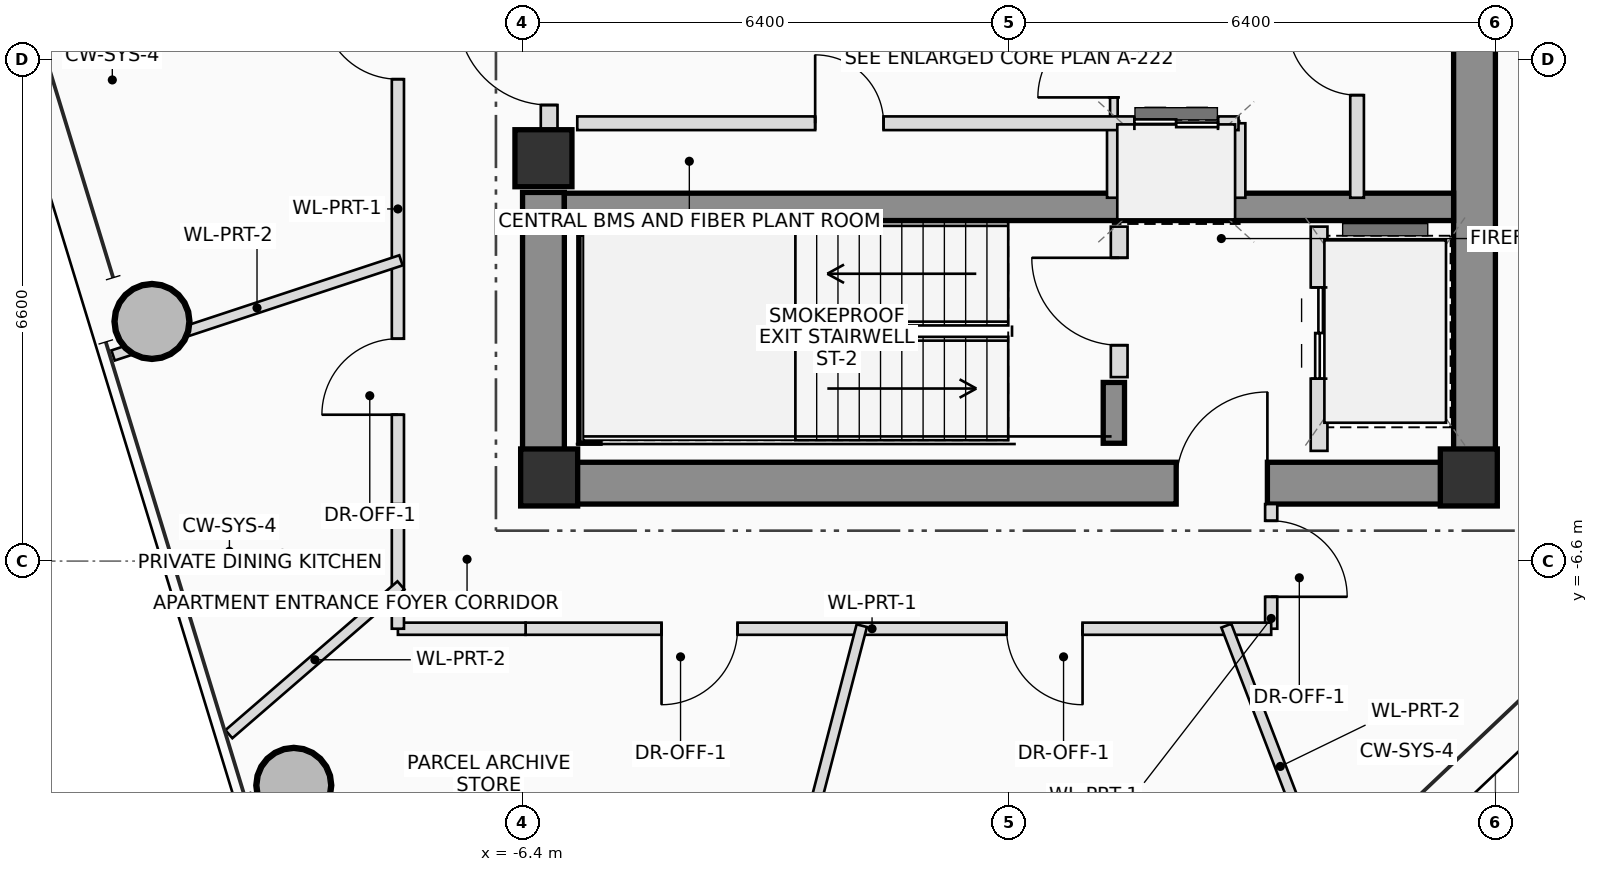
"""IFC4 building model, lengths in metres.
Left out: names, types, materials, properties, quantities, classifications, styles, units other than length and angle.
Written with IfcOpenShell. Run it as: python <this file> out.ifc"""

import sys

from ifc_helpers import new_model, si_unit, direction, frame, frame_2d, origin, origin_2d, place, context, subcontext, project, spatial, rectangle, hollow_circle, extrude, source, transform, mapped, element, fill, save


model = new_model("IFC4")
c1 = context("Model", 3, precision=1e-05, world=origin(), true_north=direction((0.0, 1.0)))
c2 = subcontext(c1, "Body", "Model", "MODEL_VIEW")
j1 = project(units=[si_unit("LENGTHUNIT", "METRE"), si_unit("PLANEANGLEUNIT", "RADIAN")], contexts=[c1])
p1 = place(None, origin())
s1 = spatial("IfcSite", under=j1, at=p1, CompositionType="ELEMENT")
p2 = place(p1, origin())
s2 = spatial("IfcBuilding", under=s1, at=p2, CompositionType="ELEMENT")
p3 = place(p2, frame((0.0, 0.0, 238.85)))
s3 = spatial("IfcBuildingStorey", under=s2, at=p3, CompositionType="ELEMENT", Elevation=238.85)
m1 = source(origin(), c2, "Body", "SweptSolid", [
    extrude(rectangle(XDim=0.75, YDim=0.75, at=origin_2d()), origin(), (0.0, 0.0, 1.0), 3.4),
])
for number, where, z_axis, x_axis in (
    (1, (-6.05, -5.5, 0.0), (0.0, 0.0, 1.0), (1.0, 0.0, 0.0)),
    (2, (6.05, -5.5, 0.0), (0.0, 0.0, 1.0), (1.0, 0.0, 0.0)),
):
    element("IfcColumn", number, at=place(p3, frame(where, z_axis=z_axis, x_axis=x_axis)), inside=s3, PredefinedType="COLUMN", context=c2, shape_type="MappedRepresentation", body=[
        mapped(m1, transform((0.0, 0.0, 0.0), scale=1.0)),
    ])
p4 = place(p3, frame((-6.4, -5.575, 0.0), z_axis=(0.0, 0.0, 1.0), x_axis=(1.0, 0.0, 0.0)))
e3 = element("IfcWall", 3, at=p4, inside=s3, PredefinedType="SHEAR", context=c2, shape_type="SweptSolid", body=[
    extrude(rectangle(XDim=12.8, YDim=0.55, at=frame_2d((6.4, 0.0))), origin(), (0.0, 0.0, 1.0), 3.4),
])
p5 = place(p4, frame((8.6, 0.0, 0.0)))
e4 = element("IfcOpeningElement", 4, at=p5, cuts=e3, PredefinedType="OPENING", context=c2, shape_type="SweptSolid", body=[
    extrude(rectangle(XDim=1.2, YDim=2.2, at=frame_2d((0.6, 1.1))), frame((0.0, 0.285, 0.0), z_axis=(0.0, -1.0, 0.0), x_axis=(1.0, 0.0, 0.0)), (0.0, 0.0, 1.0), 0.57),
])
p6 = place(p3, frame((6.125, -5.3, 0.0), z_axis=(0.0, 0.0, 1.0), x_axis=(0.0, 1.0, 0.0)))
e5 = element("IfcWall", 5, at=p6, inside=s3, PredefinedType="SHEAR", context=c2, shape_type="SweptSolid", body=[
    extrude(rectangle(XDim=10.6, YDim=0.55, at=frame_2d((5.3, 0.0))), origin(), (0.0, 0.0, 1.0), 3.4),
])
p7 = place(p3, frame((-6.125, -5.3, 0.0), z_axis=(0.0, 0.0, 1.0), x_axis=(0.0, 1.0, 0.0)))
e6 = element("IfcWall", 6, at=p7, inside=s3, PredefinedType="SHEAR", context=c2, shape_type="SweptSolid", body=[
    extrude(rectangle(XDim=3.55, YDim=0.55, at=frame_2d((1.775, 0.0))), origin(), (0.0, 0.0, 1.0), 3.4),
])
p8 = place(p3, frame((-5.85, -1.94, 0.0), z_axis=(0.0, 0.0, 1.0), x_axis=(1.0, 0.0, 0.0)))
e7 = element("IfcWall", 7, at=p8, inside=s3, PredefinedType="SHEAR", context=c2, shape_type="SweptSolid", body=[
    extrude(rectangle(XDim=11.7, YDim=0.36, at=frame_2d((5.85, 0.0))), origin(), (0.0, 0.0, 1.0), 3.4),
])
p9 = place(p3, frame((-5.52, -5.05, 0.0), z_axis=(0.0, 0.0, 1.0), x_axis=(0.0, 1.0, 0.0)))
e8 = element("IfcWall", 8, at=p9, inside=s3, PredefinedType="SHEAR", context=c2, shape_type="SweptSolid", body=[
    extrude(rectangle(XDim=2.75, YDim=0.28, at=frame_2d((1.375, 0.0))), origin(), (0.0, 0.0, 1.0), 3.4),
])
p10 = place(p3, frame((1.38, -5.05, 0.0), z_axis=(0.0, 0.0, 1.0), x_axis=(0.0, 1.0, 0.0)))
e9 = element("IfcWall", 9, at=p10, inside=s3, PredefinedType="SHEAR", context=c2, shape_type="SweptSolid", body=[
    extrude(rectangle(XDim=0.8, YDim=0.28, at=frame_2d((0.4, 0.0))), origin(), (0.0, 0.0, 1.0), 3.4),
])
p11 = place(p3, frame((-6.125, -1.3, 0.0), z_axis=(0.0, 0.0, 1.0), x_axis=(1.0, 0.0, 0.0)))
e10 = element("IfcColumn", 10, at=p11, inside=s3, PredefinedType="COLUMN", context=c2, shape_type="MappedRepresentation", body=[
    mapped(m1, transform((0.0, 0.0, 0.0), scale=1.0)),
])
m2 = source(origin(), c2, "Body", "SweptSolid", [
    extrude(hollow_circle(Radius=0.5, WallThickness=0.04, at=origin_2d()), origin(), (0.0, 0.0, 1.0), 3.4),
])
for number, where, z_axis, x_axis in (
    (11, (-11.276, -3.448, 0.0), (0.0, 0.0, 1.0), (1.0, 0.0, 0.0)),
    (12, (-9.41, -9.55, 0.0), (0.0, 0.0, 1.0), (1.0, 0.0, 0.0)),
):
    element("IfcColumn", number, at=place(p3, frame(where, z_axis=z_axis, x_axis=x_axis)), inside=s3, PredefinedType="COLUMN", context=c2, shape_type="MappedRepresentation", body=[
        mapped(m2, transform((0.0, 0.0, 0.0), scale=1.0)),
    ])
p12 = place(p3, frame((-6.05, -0.95, 0.0), z_axis=(0.0, 0.0, 1.0), x_axis=(0.0, 1.0, 0.0)))
e13 = element("IfcWall", 13, at=p12, inside=s3, PredefinedType="PLUMBINGWALL", context=c2, shape_type="SweptSolid", body=[
    extrude(rectangle(XDim=1.9, YDim=0.22, at=frame_2d((0.95, 0.0))), origin(), (0.0, 0.0, 1.0), 2.18),
])
p13 = place(p12, frame((0.35, 0.0, 0.0)))
e14 = element("IfcOpeningElement", 14, at=p13, cuts=e13, PredefinedType="OPENING", context=c2, shape_type="SweptSolid", body=[
    extrude(rectangle(XDim=1.2, YDim=2.2, at=frame_2d((0.6, 1.1))), frame((0.0, 0.12, 0.0), z_axis=(0.0, -1.0, 0.0), x_axis=(1.0, 0.0, 0.0)), (0.0, 0.0, 1.0), 0.24),
])
p14 = place(p3, frame((1.45, -4.18, 0.0), z_axis=(0.0, 0.0, 1.0), x_axis=(0.0, 1.0, 0.0)))
e15 = element("IfcWall", 15, at=p14, inside=s3, PredefinedType="PLUMBINGWALL", context=c2, shape_type="SweptSolid", body=[
    extrude(rectangle(XDim=1.98, YDim=0.22, at=frame_2d((0.99, 0.0))), origin(), (0.0, 0.0, 1.0), 3.2),
])
p15 = place(p14, frame((0.42, 0.0, 0.0)))
e16 = element("IfcOpeningElement", 16, at=p15, cuts=e15, PredefinedType="OPENING", context=c2, shape_type="SweptSolid", body=[
    extrude(rectangle(XDim=1.15, YDim=2.15, at=frame_2d((0.575, 1.075))), frame((0.0, 0.12, 0.0), z_axis=(0.0, -1.0, 0.0), x_axis=(1.0, 0.0, 0.0)), (0.0, 0.0, 1.0), 0.24),
])
p16 = place(p3, frame((4.08, -5.15, 0.0), z_axis=(0.0, 0.0, 1.0), x_axis=(0.0, 1.0, 0.0)))
e17 = element("IfcWall", 17, at=p16, inside=s3, PredefinedType="PLUMBINGWALL", context=c2, shape_type="SweptSolid", body=[
    extrude(rectangle(XDim=2.95, YDim=0.22, at=frame_2d((1.475, 0.0))), origin(), (0.0, 0.0, 1.0), 3.2),
])
p17 = place(p16, frame((0.95, 0.0, 0.0)))
e18 = element("IfcOpeningElement", 18, at=p17, cuts=e17, PredefinedType="OPENING", context=c2, shape_type="SweptSolid", body=[
    extrude(rectangle(XDim=1.2, YDim=2.25, at=frame_2d((0.6, 1.125))), frame((0.0, 0.12, 0.0), z_axis=(0.0, -1.0, 0.0), x_axis=(1.0, 0.0, 0.0)), (0.0, 0.0, 1.0), 0.24),
])
p18 = place(p3, frame((1.38, -0.84, 0.0), z_axis=(0.0, 0.0, 1.0), x_axis=(0.0, 1.0, 0.0)))
e19 = element("IfcWall", 19, at=p18, inside=s3, PredefinedType="PARTITIONING", context=c2, shape_type="SweptSolid", body=[
    extrude(rectangle(XDim=1.68, YDim=0.1, at=frame_2d((0.84, 0.0))), origin(), (0.0, 0.0, 1.0), 3.2),
])
p19 = place(p18, frame((0.34, 0.0, 0.0)))
e20 = element("IfcOpeningElement", 20, at=p19, cuts=e19, PredefinedType="OPENING", context=c2, shape_type="SweptSolid", body=[
    extrude(rectangle(XDim=1.0, YDim=2.25, at=frame_2d((0.5, 1.125))), frame((0.0, 0.06, 0.0), z_axis=(0.0, -1.0, 0.0), x_axis=(1.0, 0.0, 0.0)), (0.0, 0.0, 1.0), 0.12),
])
for number, where, z_axis, x_axis in (
    (21, (1.38, -1.82, 0.0), (0.0, 0.0, 1.0), (0.0, 1.0, 0.0)),
    (22, (3.02, -1.82, 0.0), (0.0, 0.0, 1.0), (0.0, 1.0, 0.0)),
):
    element("IfcWall", number, at=place(p3, frame(where, z_axis=z_axis, x_axis=x_axis)), inside=s3, PredefinedType="PLUMBINGWALL", context=c2, shape_type="SweptSolid", body=[
        extrude(rectangle(XDim=0.98, YDim=0.18, at=frame_2d((0.49, 0.0))), origin(), (0.0, 0.0, 1.0), 3.2),
    ])
p20 = place(p3, frame((4.58, -1.82, 0.0), z_axis=(0.0, 0.0, 1.0), x_axis=(0.0, 1.0, 0.0)))
e23 = element("IfcWall", 23, at=p20, inside=s3, PredefinedType="PLUMBINGWALL", context=c2, shape_type="SweptSolid", body=[
    extrude(rectangle(XDim=3.64, YDim=0.18, at=frame_2d((1.82, 0.0))), origin(), (0.0, 0.0, 1.0), 3.2),
])
p21 = place(p20, frame((1.35, 0.0, 0.0)))
e24 = element("IfcOpeningElement", 24, at=p21, cuts=e23, PredefinedType="OPENING", context=c2, shape_type="SweptSolid", body=[
    extrude(rectangle(XDim=0.9, YDim=2.05, at=frame_2d((0.45, 1.025))), frame((0.0, 0.1, 0.0), z_axis=(0.0, -1.0, 0.0), x_axis=(1.0, 0.0, 0.0)), (0.0, 0.0, 1.0), 0.2),
])
p22 = place(p3, frame((-5.68, -0.84, 0.0), z_axis=(0.0, 0.0, 1.0), x_axis=(1.0, 0.0, 0.0)))
e25 = element("IfcWall", 25, at=p22, inside=s3, PredefinedType="PLUMBINGWALL", context=c2, shape_type="SweptSolid", body=[
    extrude(rectangle(XDim=8.7, YDim=0.18, at=frame_2d((4.35, 0.0))), origin(), (0.0, 0.0, 1.0), 3.2),
])
p23 = place(p22, frame((3.13, 0.0, 0.0)))
e26 = element("IfcOpeningElement", 26, at=p23, cuts=e25, PredefinedType="OPENING", context=c2, shape_type="SweptSolid", body=[
    extrude(rectangle(XDim=0.9, YDim=2.05, at=frame_2d((0.45, 1.025))), frame((0.0, 0.1, 0.0), z_axis=(0.0, -1.0, 0.0), x_axis=(1.0, 0.0, 0.0)), (0.0, 0.0, 1.0), 0.2),
])
p24 = place(p22, frame((7.33, 0.0, 0.0)))
e27 = element("IfcOpeningElement", 27, at=p24, cuts=e25, PredefinedType="OPENING", context=c2, shape_type="SweptSolid", body=[
    extrude(rectangle(XDim=1.1, YDim=2.2, at=frame_2d((0.55, 1.1))), frame((0.0, 0.1, 0.0), z_axis=(0.0, -1.0, 0.0), x_axis=(1.0, 0.0, 0.0)), (0.0, 0.0, 1.0), 0.2),
])
p25 = place(p3, frame((3.45, -5.85, 0.0), z_axis=(0.0, 0.0, 1.0), x_axis=(0.0, -1.0, 0.0)))
e28 = element("IfcWall", 28, at=p25, inside=s3, PredefinedType="PARTITIONING", context=c2, shape_type="SweptSolid", body=[
    extrude(rectangle(XDim=1.64, YDim=0.16, at=frame_2d((0.82, 0.0))), origin(), (0.0, 0.0, 1.0), 3.2),
])
p26 = place(p25, frame((0.22, 0.0, 0.0)))
e29 = element("IfcOpeningElement", 29, at=p26, cuts=e28, PredefinedType="OPENING", context=c2, shape_type="SweptSolid", body=[
    extrude(rectangle(XDim=1.0, YDim=2.25, at=frame_2d((0.5, 1.125))), frame((0.0, 0.09, 0.0), z_axis=(0.0, -1.0, 0.0), x_axis=(1.0, 0.0, 0.0)), (0.0, 0.0, 1.0), 0.18),
])
p27 = place(p3, frame((3.45, -7.49, 0.0), z_axis=(0.0, 0.0, 1.0), x_axis=(-1.0, 0.0, 0.0)))
e30 = element("IfcWall", 30, at=p27, inside=s3, PredefinedType="PARTITIONING", context=c2, shape_type="SweptSolid", body=[
    extrude(rectangle(XDim=9.81, YDim=0.16, at=frame_2d((4.905, 0.0))), origin(), (0.0, 0.0, 1.0), 2.605),
])
p28 = place(p27, frame((2.482, 0.0, 0.0)))
e31 = element("IfcOpeningElement", 31, at=p28, cuts=e30, PredefinedType="OPENING", context=c2, shape_type="SweptSolid", body=[
    extrude(rectangle(XDim=1.0, YDim=2.25, at=frame_2d((0.5, 1.125))), frame((0.0, 0.09, 0.0), z_axis=(0.0, -1.0, 0.0), x_axis=(1.0, 0.0, 0.0)), (0.0, 0.0, 1.0), 0.18),
])
p29 = place(p27, frame((7.021, 0.0, 0.0)))
e32 = element("IfcOpeningElement", 32, at=p29, cuts=e30, PredefinedType="OPENING", context=c2, shape_type="SweptSolid", body=[
    extrude(rectangle(XDim=1.0, YDim=2.25, at=frame_2d((0.5, 1.125))), frame((0.0, 0.09, 0.0), z_axis=(0.0, -1.0, 0.0), x_axis=(1.0, 0.0, 0.0)), (0.0, 0.0, 1.0), 0.18),
])
p30 = place(p3, frame((-6.36, -7.49, 0.0), z_axis=(0.0, 0.0, 1.0), x_axis=(-1.0, 0.0, 0.0)))
e33 = element("IfcWall", 33, at=p30, inside=s3, PredefinedType="PARTITIONING", context=c2, shape_type="SweptSolid", body=[
    extrude(rectangle(XDim=1.68, YDim=0.16, at=frame_2d((0.84, 0.0))), origin(), (0.0, 0.0, 1.0), 2.605),
])
p31 = place(p3, frame((-8.04, -7.49, 0.0), z_axis=(0.0, 0.0, 1.0), x_axis=(0.0, 1.0, 0.0)))
e34 = element("IfcWall", 34, at=p31, inside=s3, PredefinedType="PARTITIONING", context=c2, shape_type="SweptSolid", body=[
    extrude(rectangle(XDim=1.64, YDim=0.16, at=frame_2d((0.82, 0.0))), origin(), (0.0, 0.0, 1.0), 2.805),
])
p32 = place(p3, frame((-8.04, -5.85, 0.0), z_axis=(0.0, 0.0, 1.0), x_axis=(0.0, 1.0, 0.0)))
e35 = element("IfcWall", 35, at=p32, inside=s3, PredefinedType="PARTITIONING", context=c2, shape_type="SweptSolid", body=[
    extrude(rectangle(XDim=11.7, YDim=0.16, at=frame_2d((5.85, 0.0))), origin(), (0.0, 0.0, 1.0), 2.605),
])
p33 = place(p32, frame((1.175, 0.0, 0.0)))
e36 = element("IfcOpeningElement", 36, at=p33, cuts=e35, PredefinedType="OPENING", context=c2, shape_type="SweptSolid", body=[
    extrude(rectangle(XDim=1.0, YDim=2.25, at=frame_2d((0.5, 1.125))), frame((0.0, 0.09, 0.0), z_axis=(0.0, -1.0, 0.0), x_axis=(1.0, 0.0, 0.0)), (0.0, 0.0, 1.0), 0.18),
])
p34 = place(p32, frame((5.59, 0.0, 0.0)))
e37 = element("IfcOpeningElement", 37, at=p34, cuts=e35, PredefinedType="OPENING", context=c2, shape_type="SweptSolid", body=[
    extrude(rectangle(XDim=1.0, YDim=2.25, at=frame_2d((0.5, 1.125))), frame((0.0, 0.09, 0.0), z_axis=(0.0, -1.0, 0.0), x_axis=(1.0, 0.0, 0.0)), (0.0, 0.0, 1.0), 0.18),
])
p35 = place(p32, frame((9.766, 0.0, 0.0)))
e38 = element("IfcOpeningElement", 38, at=p35, cuts=e35, PredefinedType="OPENING", context=c2, shape_type="SweptSolid", body=[
    extrude(rectangle(XDim=1.0, YDim=2.25, at=frame_2d((0.5, 1.125))), frame((0.0, 0.09, 0.0), z_axis=(0.0, -1.0, 0.0), x_axis=(1.0, 0.0, 0.0)), (0.0, 0.0, 1.0), 0.18),
])
p36 = place(p3, frame((-8.0, -2.644, 0.0), z_axis=(0.0, 0.0, 1.0), x_axis=(-0.949500330173, -0.313766032263, 0.0)))
e39 = element("IfcWall", 39, at=p36, inside=s3, PredefinedType="PARTITIONING", context=c2, shape_type="SweptSolid", body=[
    extrude(rectangle(XDim=3.989, YDim=0.14, at=frame_2d((1.994, 0.0))), origin(), (0.0, 0.0, 1.0), 2.605),
])
p37 = place(p3, frame((-8.0, -6.919, 0.0), z_axis=(0.0, 0.0, 1.0), x_axis=(-0.756358809539, -0.654156977516, 0.0)))
e40 = element("IfcWall", 40, at=p37, inside=s3, PredefinedType="PARTITIONING", context=c2, shape_type="SweptSolid", body=[
    extrude(rectangle(XDim=2.993, YDim=0.14, at=frame_2d((1.497, 0.0))), origin(), (0.0, 0.0, 1.0), 2.765),
])
p38 = place(p3, frame((-1.937, -7.45, 0.0), z_axis=(0.0, 0.0, 1.0), x_axis=(-0.251581963347, -0.967835996292, 0.0)))
e41 = element("IfcWall", 41, at=p38, inside=s3, PredefinedType="PARTITIONING", context=c2, shape_type="SweptSolid", body=[
    extrude(rectangle(XDim=11.988, YDim=0.14, at=frame_2d((5.994, 0.0))), origin(), (0.0, 0.0, 1.0), 2.605),
])
p39 = place(p3, frame((2.86, -7.45, 0.0), z_axis=(0.0, 0.0, 1.0), x_axis=(0.35834382605, -0.933589686282, 0.0)))
e42 = element("IfcWall", 42, at=p39, inside=s3, PredefinedType="PARTITIONING", context=c2, shape_type="SweptSolid", body=[
    extrude(rectangle(XDim=3.967, YDim=0.14, at=frame_2d((1.983, 0.0))), origin(), (0.0, 0.0, 1.0), 2.605),
])
p40 = place(p5, origin())
e43 = element("IfcDoor", 43, at=p40, inside=s3, OperationType="SINGLE_SWING_RIGHT", PredefinedType="DOOR", context=c2, shape_type="SweptSolid", body=[
    extrude(rectangle(XDim=1.2, YDim=2.2, at=frame_2d((0.6, 1.1))), frame((0.0, 0.025, 0.0), z_axis=(0.0, -1.0, 0.0), x_axis=(1.0, 0.0, 0.0)), (0.0, 0.0, 1.0), 0.05),
])
fill(e4, e43)
p41 = place(p13, origin())
e44 = element("IfcDoor", 44, at=p41, inside=s3, OperationType="SINGLE_SWING_RIGHT", PredefinedType="DOOR", context=c2, shape_type="SweptSolid", body=[
    extrude(rectangle(XDim=1.2, YDim=2.2, at=frame_2d((0.6, 1.1))), frame((0.0, 0.025, 0.0), z_axis=(0.0, -1.0, 0.0), x_axis=(1.0, 0.0, 0.0)), (0.0, 0.0, 1.0), 0.05),
])
fill(e14, e44)
p42 = place(p15, origin())
e45 = element("IfcDoor", 45, at=p42, inside=s3, OperationType="SINGLE_SWING_RIGHT", PredefinedType="DOOR", context=c2, shape_type="SweptSolid", body=[
    extrude(rectangle(XDim=1.15, YDim=2.15, at=frame_2d((0.575, 1.075))), frame((0.0, 0.025, 0.0), z_axis=(0.0, -1.0, 0.0), x_axis=(1.0, 0.0, 0.0)), (0.0, 0.0, 1.0), 0.05),
])
fill(e16, e45)
p43 = place(p17, origin())
e46 = element("IfcDoor", 46, at=p43, inside=s3, OperationType="DOUBLE_DOOR_SLIDING", PredefinedType="DOOR", context=c2, shape_type="SweptSolid", body=[
    extrude(rectangle(XDim=1.2, YDim=2.25, at=frame_2d((0.6, 1.125))), frame((0.0, 0.025, 0.0), z_axis=(0.0, -1.0, 0.0), x_axis=(1.0, 0.0, 0.0)), (0.0, 0.0, 1.0), 0.05),
])
fill(e18, e46)
p44 = place(p19, origin())
e47 = element("IfcDoor", 47, at=p44, inside=s3, OperationType="SINGLE_SWING_LEFT", PredefinedType="DOOR", context=c2, shape_type="SweptSolid", body=[
    extrude(rectangle(XDim=1.0, YDim=2.25, at=frame_2d((0.5, 1.125))), frame((0.0, 0.025, 0.0), z_axis=(0.0, -1.0, 0.0), x_axis=(1.0, 0.0, 0.0)), (0.0, 0.0, 1.0), 0.05),
])
fill(e20, e47)
p45 = place(p21, origin())
e48 = element("IfcDoor", 48, at=p45, inside=s3, OperationType="SINGLE_SWING_RIGHT", PredefinedType="DOOR", context=c2, shape_type="SweptSolid", body=[
    extrude(rectangle(XDim=0.9, YDim=2.05, at=frame_2d((0.45, 1.025))), frame((0.0, 0.025, 0.0), z_axis=(0.0, -1.0, 0.0), x_axis=(1.0, 0.0, 0.0)), (0.0, 0.0, 1.0), 0.05),
])
fill(e24, e48)
p46 = place(p23, origin())
e49 = element("IfcDoor", 49, at=p46, inside=s3, OperationType="SINGLE_SWING_LEFT", PredefinedType="DOOR", context=c2, shape_type="SweptSolid", body=[
    extrude(rectangle(XDim=0.9, YDim=2.05, at=frame_2d((0.45, 1.025))), frame((0.0, 0.025, 0.0), z_axis=(0.0, -1.0, 0.0), x_axis=(1.0, 0.0, 0.0)), (0.0, 0.0, 1.0), 0.05),
])
fill(e26, e49)
p47 = place(p24, origin())
e50 = element("IfcDoor", 50, at=p47, inside=s3, OperationType="DOUBLE_DOOR_SLIDING", PredefinedType="DOOR", context=c2, shape_type="SweptSolid", body=[
    extrude(rectangle(XDim=1.1, YDim=2.2, at=frame_2d((0.55, 1.1))), frame((0.0, 0.025, 0.0), z_axis=(0.0, -1.0, 0.0), x_axis=(1.0, 0.0, 0.0)), (0.0, 0.0, 1.0), 0.05),
])
fill(e27, e50)
p48 = place(p26, origin())
e51 = element("IfcDoor", 51, at=p48, inside=s3, OperationType="SINGLE_SWING_RIGHT", PredefinedType="DOOR", context=c2, shape_type="SweptSolid", body=[
    extrude(rectangle(XDim=1.0, YDim=2.25, at=frame_2d((0.5, 1.125))), frame((0.0, 0.025, 0.0), z_axis=(0.0, -1.0, 0.0), x_axis=(1.0, 0.0, 0.0)), (0.0, 0.0, 1.0), 0.05),
])
fill(e29, e51)
p49 = place(p28, origin())
e52 = element("IfcDoor", 52, at=p49, inside=s3, OperationType="SINGLE_SWING_LEFT", PredefinedType="DOOR", context=c2, shape_type="SweptSolid", body=[
    extrude(rectangle(XDim=1.0, YDim=2.25, at=frame_2d((0.5, 1.125))), frame((0.0, 0.025, 0.0), z_axis=(0.0, -1.0, 0.0), x_axis=(1.0, 0.0, 0.0)), (0.0, 0.0, 1.0), 0.05),
])
fill(e31, e52)
p50 = place(p29, origin())
e53 = element("IfcDoor", 53, at=p50, inside=s3, OperationType="SINGLE_SWING_RIGHT", PredefinedType="DOOR", context=c2, shape_type="SweptSolid", body=[
    extrude(rectangle(XDim=1.0, YDim=2.25, at=frame_2d((0.5, 1.125))), frame((0.0, 0.025, 0.0), z_axis=(0.0, -1.0, 0.0), x_axis=(1.0, 0.0, 0.0)), (0.0, 0.0, 1.0), 0.05),
])
fill(e32, e53)
p51 = place(p33, origin())
e54 = element("IfcDoor", 54, at=p51, inside=s3, OperationType="SINGLE_SWING_LEFT", PredefinedType="DOOR", context=c2, shape_type="SweptSolid", body=[
    extrude(rectangle(XDim=1.0, YDim=2.25, at=frame_2d((0.5, 1.125))), frame((0.0, 0.025, 0.0), z_axis=(0.0, -1.0, 0.0), x_axis=(1.0, 0.0, 0.0)), (0.0, 0.0, 1.0), 0.05),
])
fill(e36, e54)
p52 = place(p34, origin())
e55 = element("IfcDoor", 55, at=p52, inside=s3, OperationType="SINGLE_SWING_RIGHT", PredefinedType="DOOR", context=c2, shape_type="SweptSolid", body=[
    extrude(rectangle(XDim=1.0, YDim=2.25, at=frame_2d((0.5, 1.125))), frame((0.0, 0.025, 0.0), z_axis=(0.0, -1.0, 0.0), x_axis=(1.0, 0.0, 0.0)), (0.0, 0.0, 1.0), 0.05),
])
fill(e37, e55)
save(model, sys.argv[1])
